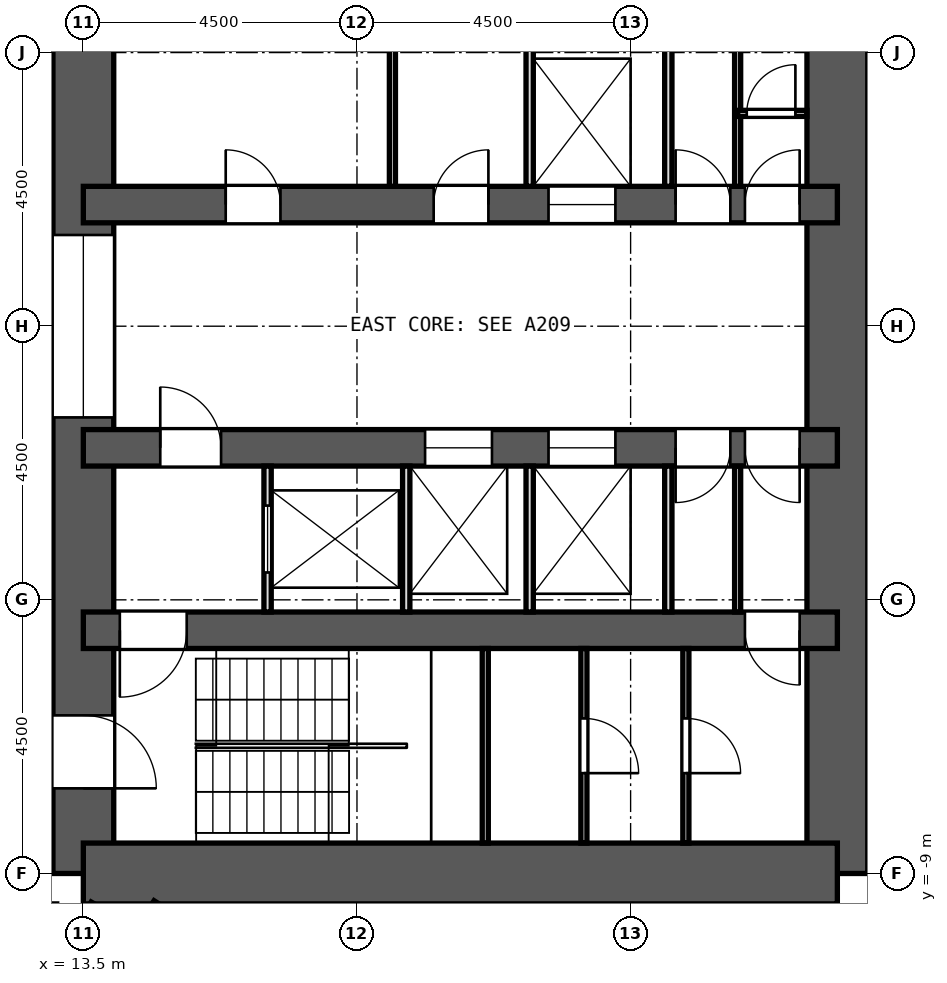
"""IFC4 building model, lengths in metres.
Left out: names, types, materials, properties, quantities, classifications, styles, units other than length and angle.
Written with IfcOpenShell. Run it as: python <this file> out.ifc"""

import sys

from ifc_helpers import new_model, si_unit, direction, frame, frame_2d, origin, place, context, subcontext, project, spatial, rectangle, extrude, element, fill, save


model = new_model("IFC4")
c1 = context("Model", 3, precision=1e-05, world=origin(), true_north=direction((0.0, 1.0)))
c2 = subcontext(c1, "Body", "Model", "MODEL_VIEW")
j1 = project(units=[si_unit("LENGTHUNIT", "METRE"), si_unit("PLANEANGLEUNIT", "RADIAN")], contexts=[c1])
p1 = place(None, origin())
s1 = spatial("IfcSite", under=j1, at=p1, CompositionType="ELEMENT")
p2 = place(p1, origin())
s2 = spatial("IfcBuilding", under=s1, at=p2, CompositionType="ELEMENT")
p3 = place(p2, frame((0.0, 0.0, 26.3)))
s3 = spatial("IfcBuildingStorey", under=s2, at=p3, CompositionType="ELEMENT", Elevation=26.3)
p4 = place(p3, frame((13.5, -9.0, 0.0), z_axis=(0.0, 0.0, 1.0), x_axis=(0.0, 1.0, 0.0)))
e1 = element("IfcWall", 1, at=p4, inside=s3, PredefinedType="SHEAR", context=c2, shape_type="SweptSolid", body=[
    extrude(rectangle(XDim=18.0, YDim=1.0, at=frame_2d((9.0, 0.0))), origin(), (0.0, 0.0, 1.0), 3.3),
])
p5 = place(p4, frame((15.4, 0.0, 0.0)))
e2 = element("IfcOpeningElement", 2, at=p5, cuts=e1, PredefinedType="OPENING", context=c2, shape_type="SweptSolid", body=[
    extrude(rectangle(XDim=1.2, YDim=2.1, at=frame_2d((0.6, 1.05))), frame((0.0, 0.512, 0.0), z_axis=(0.0, -1.0, 0.0), x_axis=(1.0, 0.0, 0.0)), (0.0, 0.0, 1.0), 1.024),
])
p6 = place(p4, frame((1.4, 0.0, 0.0)))
e3 = element("IfcOpeningElement", 3, at=p6, cuts=e1, PredefinedType="OPENING", context=c2, shape_type="SweptSolid", body=[
    extrude(rectangle(XDim=1.2, YDim=2.1, at=frame_2d((0.6, 1.05))), frame((0.0, 0.512, 0.0), z_axis=(0.0, -1.0, 0.0), x_axis=(1.0, 0.0, 0.0)), (0.0, 0.0, 1.0), 1.024),
])
p7 = place(p4, frame((7.5, 0.0, 0.0)))
e4 = element("IfcOpeningElement", 4, at=p7, cuts=e1, PredefinedType="OPENING", context=c2, shape_type="SweptSolid", body=[
    extrude(rectangle(XDim=3.0, YDim=2.4, at=frame_2d((1.5, 1.2))), frame((0.0, 0.512, 0.0), z_axis=(0.0, -1.0, 0.0), x_axis=(1.0, 0.0, 0.0)), (0.0, 0.0, 1.0), 1.024),
])
p8 = place(p3, frame((25.9, -9.0, 0.0), z_axis=(0.0, 0.0, 1.0), x_axis=(0.0, 1.0, 0.0)))
e5 = element("IfcWall", 5, at=p8, inside=s3, PredefinedType="SHEAR", context=c2, shape_type="SweptSolid", body=[
    extrude(rectangle(XDim=18.0, YDim=1.0, at=frame_2d((9.0, 0.0))), origin(), (0.0, 0.0, 1.0), 3.3),
])
p9 = place(p3, frame((13.5, -9.0, 0.0), z_axis=(0.0, 0.0, 1.0), x_axis=(1.0, 0.0, 0.0)))
e6 = element("IfcWall", 6, at=p9, inside=s3, PredefinedType="SHEAR", context=c2, shape_type="SweptSolid", body=[
    extrude(rectangle(XDim=12.4, YDim=1.0, at=frame_2d((6.2, 0.0))), origin(), (0.0, 0.0, 1.0), 3.3),
])
p10 = place(p3, frame((13.5, -5.0, 0.0), z_axis=(0.0, 0.0, 1.0), x_axis=(1.0, 0.0, 0.0)))
e7 = element("IfcWall", 7, at=p10, inside=s3, PredefinedType="SHEAR", context=c2, shape_type="SweptSolid", body=[
    extrude(rectangle(XDim=12.4, YDim=0.6, at=frame_2d((6.2, 0.0))), origin(), (0.0, 0.0, 1.0), 3.3),
])
p11 = place(p10, frame((10.88, 0.0, 0.0)))
e8 = element("IfcOpeningElement", 8, at=p11, cuts=e7, PredefinedType="OPENING", context=c2, shape_type="SweptSolid", body=[
    extrude(rectangle(XDim=0.9, YDim=2.1, at=frame_2d((0.45, 1.05))), frame((0.0, 0.312, 0.0), z_axis=(0.0, -1.0, 0.0), x_axis=(1.0, 0.0, 0.0)), (0.0, 0.0, 1.0), 0.624),
])
p12 = place(p10, frame((0.6, 0.0, 0.0)))
e9 = element("IfcOpeningElement", 9, at=p12, cuts=e7, PredefinedType="OPENING", context=c2, shape_type="SweptSolid", body=[
    extrude(rectangle(XDim=1.1, YDim=2.1, at=frame_2d((0.55, 1.05))), frame((0.0, 0.312, 0.0), z_axis=(0.0, -1.0, 0.0), x_axis=(1.0, 0.0, 0.0)), (0.0, 0.0, 1.0), 0.624),
])
p13 = place(p3, frame((13.5, 2.0, 0.0), z_axis=(0.0, 0.0, 1.0), x_axis=(1.0, 0.0, 0.0)))
e10 = element("IfcWall", 10, at=p13, inside=s3, PredefinedType="SHEAR", context=c2, shape_type="SweptSolid", body=[
    extrude(rectangle(XDim=12.4, YDim=0.6, at=frame_2d((6.2, 0.0))), origin(), (0.0, 0.0, 1.0), 3.3),
])
p14 = place(p13, frame((7.65, 0.0, 0.0)))
e11 = element("IfcOpeningElement", 11, at=p14, cuts=e10, PredefinedType="OPENING", context=c2, shape_type="SweptSolid", body=[
    extrude(rectangle(XDim=1.1, YDim=2.1, at=frame_2d((0.55, 1.05))), frame((0.0, 0.312, 0.0), z_axis=(0.0, -1.0, 0.0), x_axis=(1.0, 0.0, 0.0)), (0.0, 0.0, 1.0), 0.624),
])
p15 = place(p13, frame((2.341, 0.0, 0.0)))
e12 = element("IfcOpeningElement", 12, at=p15, cuts=e10, PredefinedType="OPENING", context=c2, shape_type="SweptSolid", body=[
    extrude(rectangle(XDim=0.9, YDim=2.1, at=frame_2d((0.45, 1.05))), frame((0.0, 0.312, 0.0), z_axis=(0.0, -1.0, 0.0), x_axis=(1.0, 0.0, 0.0)), (0.0, 0.0, 1.0), 0.624),
])
p16 = place(p13, frame((5.761, 0.0, 0.0)))
e13 = element("IfcOpeningElement", 13, at=p16, cuts=e10, PredefinedType="OPENING", context=c2, shape_type="SweptSolid", body=[
    extrude(rectangle(XDim=0.9, YDim=2.1, at=frame_2d((0.45, 1.05))), frame((0.0, 0.312, 0.0), z_axis=(0.0, -1.0, 0.0), x_axis=(1.0, 0.0, 0.0)), (0.0, 0.0, 1.0), 0.624),
])
p17 = place(p13, frame((9.74, 0.0, 0.0)))
e14 = element("IfcOpeningElement", 14, at=p17, cuts=e10, PredefinedType="OPENING", context=c2, shape_type="SweptSolid", body=[
    extrude(rectangle(XDim=0.9, YDim=2.1, at=frame_2d((0.45, 1.05))), frame((0.0, 0.312, 0.0), z_axis=(0.0, -1.0, 0.0), x_axis=(1.0, 0.0, 0.0)), (0.0, 0.0, 1.0), 0.624),
])
p18 = place(p13, frame((10.88, 0.0, 0.0)))
e15 = element("IfcOpeningElement", 15, at=p18, cuts=e10, PredefinedType="OPENING", context=c2, shape_type="SweptSolid", body=[
    extrude(rectangle(XDim=0.9, YDim=2.1, at=frame_2d((0.45, 1.05))), frame((0.0, 0.312, 0.0), z_axis=(0.0, -1.0, 0.0), x_axis=(1.0, 0.0, 0.0)), (0.0, 0.0, 1.0), 0.624),
])
p19 = place(p3, frame((13.5, -2.0, 0.0), z_axis=(0.0, 0.0, 1.0), x_axis=(1.0, 0.0, 0.0)))
e16 = element("IfcWall", 16, at=p19, inside=s3, PredefinedType="SHEAR", context=c2, shape_type="SweptSolid", body=[
    extrude(rectangle(XDim=12.4, YDim=0.6, at=frame_2d((6.2, 0.0))), origin(), (0.0, 0.0, 1.0), 3.3),
])
p20 = place(p19, frame((5.62, 0.0, 0.0)))
e17 = element("IfcOpeningElement", 17, at=p20, cuts=e16, PredefinedType="OPENING", context=c2, shape_type="SweptSolid", body=[
    extrude(rectangle(XDim=1.1, YDim=2.1, at=frame_2d((0.55, 1.05))), frame((0.0, 0.312, 0.0), z_axis=(0.0, -1.0, 0.0), x_axis=(1.0, 0.0, 0.0)), (0.0, 0.0, 1.0), 0.624),
])
p21 = place(p19, frame((7.65, 0.0, 0.0)))
e18 = element("IfcOpeningElement", 18, at=p21, cuts=e16, PredefinedType="OPENING", context=c2, shape_type="SweptSolid", body=[
    extrude(rectangle(XDim=1.1, YDim=2.1, at=frame_2d((0.55, 1.05))), frame((0.0, 0.312, 0.0), z_axis=(0.0, -1.0, 0.0), x_axis=(1.0, 0.0, 0.0)), (0.0, 0.0, 1.0), 0.624),
])
p22 = place(p19, frame((1.265, 0.0, 0.0)))
e19 = element("IfcOpeningElement", 19, at=p22, cuts=e16, PredefinedType="OPENING", context=c2, shape_type="SweptSolid", body=[
    extrude(rectangle(XDim=1.0, YDim=2.1, at=frame_2d((0.5, 1.05))), frame((0.0, 0.312, 0.0), z_axis=(0.0, -1.0, 0.0), x_axis=(1.0, 0.0, 0.0)), (0.0, 0.0, 1.0), 0.624),
])
p23 = place(p19, frame((9.74, 0.0, 0.0)))
e20 = element("IfcOpeningElement", 20, at=p23, cuts=e16, PredefinedType="OPENING", context=c2, shape_type="SweptSolid", body=[
    extrude(rectangle(XDim=0.9, YDim=2.1, at=frame_2d((0.45, 1.05))), frame((0.0, 0.312, 0.0), z_axis=(0.0, -1.0, 0.0), x_axis=(1.0, 0.0, 0.0)), (0.0, 0.0, 1.0), 0.624),
])
p24 = place(p19, frame((10.88, 0.0, 0.0)))
e21 = element("IfcOpeningElement", 21, at=p24, cuts=e16, PredefinedType="OPENING", context=c2, shape_type="SweptSolid", body=[
    extrude(rectangle(XDim=0.9, YDim=2.1, at=frame_2d((0.45, 1.05))), frame((0.0, 0.312, 0.0), z_axis=(0.0, -1.0, 0.0), x_axis=(1.0, 0.0, 0.0)), (0.0, 0.0, 1.0), 0.624),
])
p25 = place(p3, frame((26.208, -11.585, 0.0), z_axis=(0.0, 0.0, 1.0), x_axis=(0.342028474173, 0.939689588564, 0.0)))
e22 = element("IfcWall", 22, at=p25, inside=s3, PredefinedType="SOLIDWALL", context=c2, shape_type="SweptSolid", body=[
    extrude(rectangle(XDim=3.846, YDim=0.6, at=frame_2d((1.923, 0.0))), origin(), (0.0, 0.0, 1.0), 2.75),
])
p26 = place(p3, frame((14.629, -9.5, 0.0), z_axis=(0.0, 0.0, 1.0), x_axis=(0.838795721465, -0.544446267002, 0.0)))
e23 = element("IfcWall", 23, at=p26, inside=s3, PredefinedType="PARTITIONING", context=c2, shape_type="SweptSolid", body=[
    extrude(rectangle(XDim=1.583, YDim=0.125, at=frame_2d((0.792, 0.0))), origin(), (0.0, 0.0, 1.0), 2.75),
])
p27 = place(p3, frame((13.04, -10.614, 0.0), z_axis=(0.0, 0.0, 1.0), x_axis=(0.500018234033, 0.866014876105, 0.0)))
e24 = element("IfcWall", 24, at=p27, inside=s3, PredefinedType="PARTITIONING", context=c2, shape_type="SweptSolid", body=[
    extrude(rectangle(XDim=1.286, YDim=0.125, at=frame_2d((0.643, 0.0))), origin(), (0.0, 0.0, 1.0), 2.75),
])
p28 = place(p3, frame((18.583, 2.3, 0.0), z_axis=(0.0, 0.0, 1.0), x_axis=(0.0, 1.0, 0.0)))
e25 = element("IfcWall", 25, at=p28, inside=s3, PredefinedType="PARTITIONING", context=c2, shape_type="SweptSolid", body=[
    extrude(rectangle(XDim=2.4, YDim=0.1, at=frame_2d((1.2, 0.0))), origin(), (0.0, 0.0, 1.0), 2.75),
])
for number, where, z_axis, x_axis in (
    (26, (20.84, 2.3, 0.0), (0.0, 0.0, 1.0), (0.0, 1.0, 0.0)),
    (27, (23.12, 2.3, 0.0), (0.0, 0.0, 1.0), (0.0, 1.0, 0.0)),
):
    element("IfcWall", number, at=place(p3, frame(where, z_axis=z_axis, x_axis=x_axis)), inside=s3, PredefinedType="PARTITIONING", context=c2, shape_type="SweptSolid", body=[
        extrude(rectangle(XDim=2.4, YDim=0.12, at=frame_2d((1.2, 0.0))), origin(), (0.0, 0.0, 1.0), 2.75),
    ])
p29 = place(p3, frame((24.26, 2.3, 0.0), z_axis=(0.0, 0.0, 1.0), x_axis=(0.0, 1.0, 0.0)))
e28 = element("IfcWall", 28, at=p29, inside=s3, PredefinedType="PARTITIONING", context=c2, shape_type="SweptSolid", body=[
    extrude(rectangle(XDim=2.4, YDim=0.1, at=frame_2d((1.2, 0.0))), origin(), (0.0, 0.0, 1.0), 2.75),
])
p30 = place(p3, frame((16.53, -4.7, 0.0), z_axis=(0.0, 0.0, 1.0), x_axis=(0.0, 1.0, 0.0)))
e29 = element("IfcWall", 29, at=p30, inside=s3, PredefinedType="PARTITIONING", context=c2, shape_type="SweptSolid", body=[
    extrude(rectangle(XDim=2.4, YDim=0.12, at=frame_2d((1.2, 0.0))), origin(), (0.0, 0.0, 1.0), 2.75),
])
p31 = place(p30, frame((0.65, 0.0, 0.0)))
e30 = element("IfcOpeningElement", 30, at=p31, cuts=e29, PredefinedType="OPENING", context=c2, shape_type="SweptSolid", body=[
    extrude(rectangle(XDim=1.1, YDim=2.1, at=frame_2d((0.55, 1.05))), frame((0.0, 0.072, 0.0), z_axis=(0.0, -1.0, 0.0), x_axis=(1.0, 0.0, 0.0)), (0.0, 0.0, 1.0), 0.144),
])
for number, where, z_axis, x_axis in (
    (31, (18.81, -4.7, 0.0), (0.0, 0.0, 1.0), (0.0, 1.0, 0.0)),
    (32, (20.84, -4.7, 0.0), (0.0, 0.0, 1.0), (0.0, 1.0, 0.0)),
    (33, (23.12, -4.7, 0.0), (0.0, 0.0, 1.0), (0.0, 1.0, 0.0)),
):
    element("IfcWall", number, at=place(p3, frame(where, z_axis=z_axis, x_axis=x_axis)), inside=s3, PredefinedType="PARTITIONING", context=c2, shape_type="SweptSolid", body=[
        extrude(rectangle(XDim=2.4, YDim=0.12, at=frame_2d((1.2, 0.0))), origin(), (0.0, 0.0, 1.0), 2.75),
    ])
p32 = place(p3, frame((24.26, -4.7, 0.0), z_axis=(0.0, 0.0, 1.0), x_axis=(0.0, 1.0, 0.0)))
e34 = element("IfcWall", 34, at=p32, inside=s3, PredefinedType="PARTITIONING", context=c2, shape_type="SweptSolid", body=[
    extrude(rectangle(XDim=2.4, YDim=0.1, at=frame_2d((1.2, 0.0))), origin(), (0.0, 0.0, 1.0), 2.75),
])
p33 = place(p3, frame((24.26, 3.5, 0.0), z_axis=(0.0, 0.0, 1.0), x_axis=(1.0, 0.0, 0.0)))
e35 = element("IfcWall", 35, at=p33, inside=s3, PredefinedType="PARTITIONING", context=c2, shape_type="SweptSolid", body=[
    extrude(rectangle(XDim=1.14, YDim=0.1, at=frame_2d((0.57, 0.0))), origin(), (0.0, 0.0, 1.0), 2.75),
])
p34 = place(p33, frame((0.15, 0.0, 0.0)))
e36 = element("IfcOpeningElement", 36, at=p34, cuts=e35, PredefinedType="OPENING", context=c2, shape_type="SweptSolid", body=[
    extrude(rectangle(XDim=0.8, YDim=2.1, at=frame_2d((0.4, 1.05))), frame((0.0, 0.062, 0.0), z_axis=(0.0, -1.0, 0.0), x_axis=(1.0, 0.0, 0.0)), (0.0, 0.0, 1.0), 0.124),
])
p35 = place(p3, frame((20.11, -8.5, 0.0), z_axis=(0.0, 0.0, 1.0), x_axis=(0.0, 1.0, 0.0)))
e37 = element("IfcWall", 37, at=p35, inside=s3, PredefinedType="PARTITIONING", context=c2, shape_type="SweptSolid", body=[
    extrude(rectangle(XDim=3.2, YDim=0.1, at=frame_2d((1.6, 0.0))), origin(), (0.0, 0.0, 1.0), 2.75),
])
p36 = place(p3, frame((21.732, -8.5, 0.0), z_axis=(0.0, 0.0, 1.0), x_axis=(0.0, 1.0, 0.0)))
e38 = element("IfcWall", 38, at=p36, inside=s3, PredefinedType="PARTITIONING", context=c2, shape_type="SweptSolid", body=[
    extrude(rectangle(XDim=3.2, YDim=0.1, at=frame_2d((1.6, 0.0))), origin(), (0.0, 0.0, 1.0), 2.75),
])
p37 = place(p36, frame((1.15, 0.0, 0.0)))
e39 = element("IfcOpeningElement", 39, at=p37, cuts=e38, PredefinedType="OPENING", context=c2, shape_type="SweptSolid", body=[
    extrude(rectangle(XDim=0.9, YDim=2.1, at=frame_2d((0.45, 1.05))), frame((0.0, 0.062, 0.0), z_axis=(0.0, -1.0, 0.0), x_axis=(1.0, 0.0, 0.0)), (0.0, 0.0, 1.0), 0.124),
])
p38 = place(p3, frame((23.409, -8.5, 0.0), z_axis=(0.0, 0.0, 1.0), x_axis=(0.0, 1.0, 0.0)))
e40 = element("IfcWall", 40, at=p38, inside=s3, PredefinedType="PARTITIONING", context=c2, shape_type="SweptSolid", body=[
    extrude(rectangle(XDim=3.2, YDim=0.1, at=frame_2d((1.6, 0.0))), origin(), (0.0, 0.0, 1.0), 2.75),
])
p39 = place(p38, frame((1.15, 0.0, 0.0)))
e41 = element("IfcOpeningElement", 41, at=p39, cuts=e40, PredefinedType="OPENING", context=c2, shape_type="SweptSolid", body=[
    extrude(rectangle(XDim=0.9, YDim=2.1, at=frame_2d((0.45, 1.05))), frame((0.0, 0.062, 0.0), z_axis=(0.0, -1.0, 0.0), x_axis=(1.0, 0.0, 0.0)), (0.0, 0.0, 1.0), 0.124),
])
p40 = place(p14, origin())
e42 = element("IfcDoor", 42, at=p40, inside=s3, OperationType="DOUBLE_DOOR_SLIDING", PredefinedType="DOOR", context=c2, shape_type="SweptSolid", body=[
    extrude(rectangle(XDim=1.1, YDim=2.1, at=frame_2d((0.55, 1.05))), frame((0.0, 0.025, 0.0), z_axis=(0.0, -1.0, 0.0), x_axis=(1.0, 0.0, 0.0)), (0.0, 0.0, 1.0), 0.05),
])
fill(e11, e42)
p41 = place(p31, origin())
e43 = element("IfcDoor", 43, at=p41, inside=s3, OperationType="DOUBLE_DOOR_SLIDING", PredefinedType="DOOR", context=c2, shape_type="SweptSolid", body=[
    extrude(rectangle(XDim=1.1, YDim=2.1, at=frame_2d((0.55, 1.05))), frame((0.0, 0.025, 0.0), z_axis=(0.0, -1.0, 0.0), x_axis=(1.0, 0.0, 0.0)), (0.0, 0.0, 1.0), 0.05),
])
fill(e30, e43)
p42 = place(p20, origin())
e44 = element("IfcDoor", 44, at=p42, inside=s3, OperationType="DOUBLE_DOOR_SLIDING", PredefinedType="DOOR", context=c2, shape_type="SweptSolid", body=[
    extrude(rectangle(XDim=1.1, YDim=2.1, at=frame_2d((0.55, 1.05))), frame((0.0, 0.025, 0.0), z_axis=(0.0, -1.0, 0.0), x_axis=(1.0, 0.0, 0.0)), (0.0, 0.0, 1.0), 0.05),
])
fill(e17, e44)
p43 = place(p21, origin())
e45 = element("IfcDoor", 45, at=p43, inside=s3, OperationType="DOUBLE_DOOR_SLIDING", PredefinedType="DOOR", context=c2, shape_type="SweptSolid", body=[
    extrude(rectangle(XDim=1.1, YDim=2.1, at=frame_2d((0.55, 1.05))), frame((0.0, 0.025, 0.0), z_axis=(0.0, -1.0, 0.0), x_axis=(1.0, 0.0, 0.0)), (0.0, 0.0, 1.0), 0.05),
])
fill(e18, e45)
p44 = place(p15, origin())
e46 = element("IfcDoor", 46, at=p44, inside=s3, OperationType="SINGLE_SWING_LEFT", PredefinedType="DOOR", context=c2, shape_type="SweptSolid", body=[
    extrude(rectangle(XDim=0.9, YDim=2.1, at=frame_2d((0.45, 1.05))), frame((0.0, 0.025, 0.0), z_axis=(0.0, -1.0, 0.0), x_axis=(1.0, 0.0, 0.0)), (0.0, 0.0, 1.0), 0.05),
])
fill(e12, e46)
p45 = place(p16, origin())
e47 = element("IfcDoor", 47, at=p45, inside=s3, OperationType="SINGLE_SWING_RIGHT", PredefinedType="DOOR", context=c2, shape_type="SweptSolid", body=[
    extrude(rectangle(XDim=0.9, YDim=2.1, at=frame_2d((0.45, 1.05))), frame((0.0, 0.025, 0.0), z_axis=(0.0, -1.0, 0.0), x_axis=(1.0, 0.0, 0.0)), (0.0, 0.0, 1.0), 0.05),
])
fill(e13, e47)
p46 = place(p17, origin())
e48 = element("IfcDoor", 48, at=p46, inside=s3, OperationType="SINGLE_SWING_LEFT", PredefinedType="DOOR", context=c2, shape_type="SweptSolid", body=[
    extrude(rectangle(XDim=0.9, YDim=2.1, at=frame_2d((0.45, 1.05))), frame((0.0, 0.025, 0.0), z_axis=(0.0, -1.0, 0.0), x_axis=(1.0, 0.0, 0.0)), (0.0, 0.0, 1.0), 0.05),
])
fill(e14, e48)
p47 = place(p18, origin())
e49 = element("IfcDoor", 49, at=p47, inside=s3, OperationType="SINGLE_SWING_RIGHT", PredefinedType="DOOR", context=c2, shape_type="SweptSolid", body=[
    extrude(rectangle(XDim=0.9, YDim=2.1, at=frame_2d((0.45, 1.05))), frame((0.0, 0.025, 0.0), z_axis=(0.0, -1.0, 0.0), x_axis=(1.0, 0.0, 0.0)), (0.0, 0.0, 1.0), 0.05),
])
fill(e15, e49)
p48 = place(p22, origin())
e50 = element("IfcDoor", 50, at=p48, inside=s3, OperationType="SINGLE_SWING_LEFT", PredefinedType="DOOR", context=c2, shape_type="SweptSolid", body=[
    extrude(rectangle(XDim=1.0, YDim=2.1, at=frame_2d((0.5, 1.05))), frame((0.0, 0.025, 0.0), z_axis=(0.0, -1.0, 0.0), x_axis=(1.0, 0.0, 0.0)), (0.0, 0.0, 1.0), 0.05),
])
fill(e19, e50)
p49 = place(p23, frame((0.9, 0.0, 0.0), z_axis=(0.0, 0.0, 1.0), x_axis=(-1.0, 0.0, 0.0)))
e51 = element("IfcDoor", 51, at=p49, inside=s3, OperationType="SINGLE_SWING_RIGHT", PredefinedType="DOOR", context=c2, shape_type="SweptSolid", body=[
    extrude(rectangle(XDim=0.9, YDim=2.1, at=frame_2d((0.45, 1.05))), frame((0.0, 0.025, 0.0), z_axis=(0.0, -1.0, 0.0), x_axis=(1.0, 0.0, 0.0)), (0.0, 0.0, 1.0), 0.05),
])
fill(e20, e51)
p50 = place(p24, frame((0.9, 0.0, 0.0), z_axis=(0.0, 0.0, 1.0), x_axis=(-1.0, 0.0, 0.0)))
e52 = element("IfcDoor", 52, at=p50, inside=s3, OperationType="SINGLE_SWING_LEFT", PredefinedType="DOOR", context=c2, shape_type="SweptSolid", body=[
    extrude(rectangle(XDim=0.9, YDim=2.1, at=frame_2d((0.45, 1.05))), frame((0.0, 0.025, 0.0), z_axis=(0.0, -1.0, 0.0), x_axis=(1.0, 0.0, 0.0)), (0.0, 0.0, 1.0), 0.05),
])
fill(e21, e52)
p51 = place(p34, origin())
e53 = element("IfcDoor", 53, at=p51, inside=s3, OperationType="SINGLE_SWING_RIGHT", PredefinedType="DOOR", context=c2, shape_type="SweptSolid", body=[
    extrude(rectangle(XDim=0.8, YDim=2.1, at=frame_2d((0.4, 1.05))), frame((0.0, 0.025, 0.0), z_axis=(0.0, -1.0, 0.0), x_axis=(1.0, 0.0, 0.0)), (0.0, 0.0, 1.0), 0.05),
])
fill(e36, e53)
p52 = place(p39, frame((0.9, 0.0, 0.0), z_axis=(0.0, 0.0, 1.0), x_axis=(-1.0, 0.0, 0.0)))
e54 = element("IfcDoor", 54, at=p52, inside=s3, OperationType="SINGLE_SWING_RIGHT", PredefinedType="DOOR", context=c2, shape_type="SweptSolid", body=[
    extrude(rectangle(XDim=0.9, YDim=2.1, at=frame_2d((0.45, 1.05))), frame((0.0, 0.025, 0.0), z_axis=(0.0, -1.0, 0.0), x_axis=(1.0, 0.0, 0.0)), (0.0, 0.0, 1.0), 0.05),
])
fill(e41, e54)
p53 = place(p37, frame((0.9, 0.0, 0.0), z_axis=(0.0, 0.0, 1.0), x_axis=(-1.0, 0.0, 0.0)))
e55 = element("IfcDoor", 55, at=p53, inside=s3, OperationType="SINGLE_SWING_RIGHT", PredefinedType="DOOR", context=c2, shape_type="SweptSolid", body=[
    extrude(rectangle(XDim=0.9, YDim=2.1, at=frame_2d((0.45, 1.05))), frame((0.0, 0.025, 0.0), z_axis=(0.0, -1.0, 0.0), x_axis=(1.0, 0.0, 0.0)), (0.0, 0.0, 1.0), 0.05),
])
fill(e39, e55)
p54 = place(p11, frame((0.9, 0.0, 0.0), z_axis=(0.0, 0.0, 1.0), x_axis=(-1.0, 0.0, 0.0)))
e56 = element("IfcDoor", 56, at=p54, inside=s3, OperationType="SINGLE_SWING_LEFT", PredefinedType="DOOR", context=c2, shape_type="SweptSolid", body=[
    extrude(rectangle(XDim=0.9, YDim=2.1, at=frame_2d((0.45, 1.05))), frame((0.0, 0.025, 0.0), z_axis=(0.0, -1.0, 0.0), x_axis=(1.0, 0.0, 0.0)), (0.0, 0.0, 1.0), 0.05),
])
fill(e8, e56)
p55 = place(p12, frame((1.1, 0.0, 0.0), z_axis=(0.0, 0.0, 1.0), x_axis=(-1.0, 0.0, 0.0)))
e57 = element("IfcDoor", 57, at=p55, inside=s3, OperationType="SINGLE_SWING_RIGHT", PredefinedType="DOOR", context=c2, shape_type="SweptSolid", body=[
    extrude(rectangle(XDim=1.1, YDim=2.1, at=frame_2d((0.55, 1.05))), frame((0.0, 0.025, 0.0), z_axis=(0.0, -1.0, 0.0), x_axis=(1.0, 0.0, 0.0)), (0.0, 0.0, 1.0), 0.05),
])
fill(e9, e57)
p56 = place(p6, frame((1.2, 0.0, 0.0), z_axis=(0.0, 0.0, 1.0), x_axis=(-1.0, 0.0, 0.0)))
e58 = element("IfcDoor", 58, at=p56, inside=s3, OperationType="SINGLE_SWING_RIGHT", PredefinedType="DOOR", context=c2, shape_type="SweptSolid", body=[
    extrude(rectangle(XDim=1.2, YDim=2.1, at=frame_2d((0.6, 1.05))), frame((0.0, 0.025, 0.0), z_axis=(0.0, -1.0, 0.0), x_axis=(1.0, 0.0, 0.0)), (0.0, 0.0, 1.0), 0.05),
])
fill(e3, e58)
p57 = place(p7, origin())
e59 = element("IfcDoor", 59, at=p57, inside=s3, OperationType="DOUBLE_DOOR_SLIDING", PredefinedType="DOOR", context=c2, shape_type="SweptSolid", body=[
    extrude(rectangle(XDim=3.0, YDim=2.4, at=frame_2d((1.5, 1.2))), frame((0.0, 0.025, 0.0), z_axis=(0.0, -1.0, 0.0), x_axis=(1.0, 0.0, 0.0)), (0.0, 0.0, 1.0), 0.05),
])
fill(e4, e59)
save(model, sys.argv[1])
